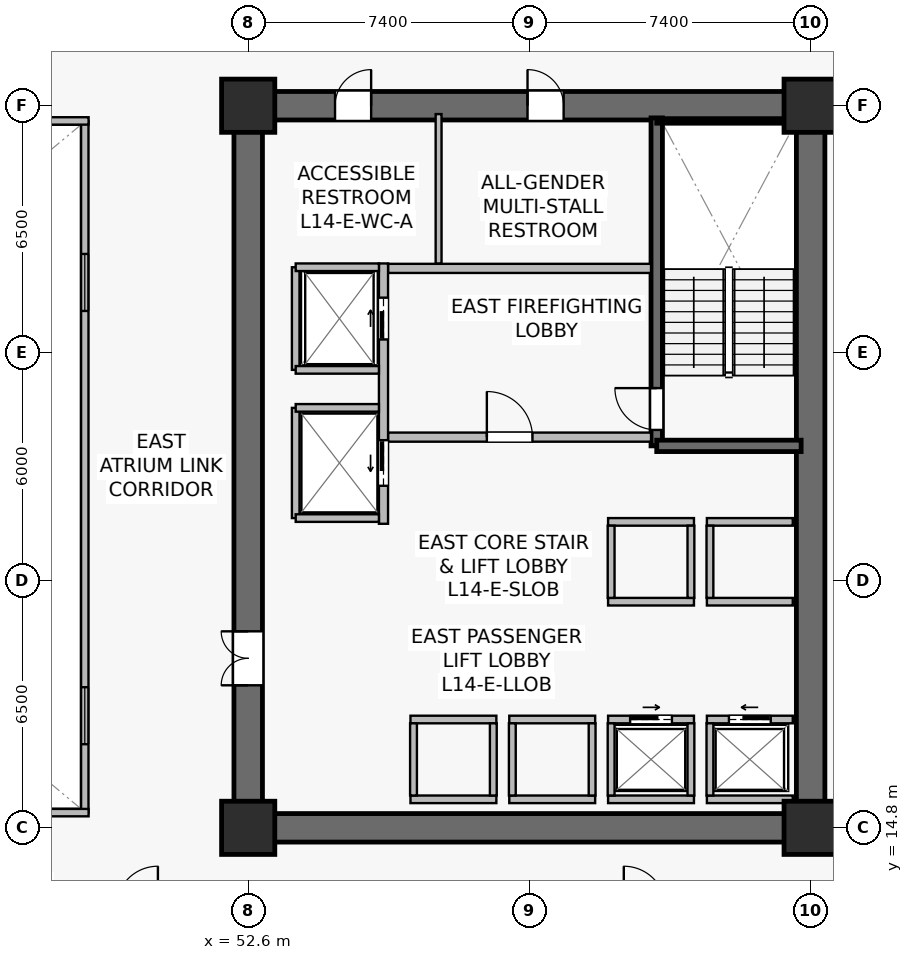
"""IFC4 building model, lengths in metres.
Left out: names, types, materials, properties, quantities, classifications, styles, units other than length and angle.
Written with IfcOpenShell. Run it as: python <this file> out.ifc"""

import sys

from ifc_helpers import new_model, si_unit, direction, frame, frame_2d, origin, origin_2d, place, context, subcontext, project, spatial, rectangle, extrude, source, transform, mapped, element, fill, save


model = new_model("IFC4")
c1 = context("Model", 3, precision=1e-05, world=origin(), true_north=direction((0.0, 1.0)))
c2 = subcontext(c1, "Body", "Model", "MODEL_VIEW")
j1 = project(units=[si_unit("LENGTHUNIT", "METRE"), si_unit("PLANEANGLEUNIT", "RADIAN")], contexts=[c1])
p1 = place(None, origin())
s1 = spatial("IfcSite", under=j1, at=p1, CompositionType="ELEMENT")
p2 = place(p1, origin())
s2 = spatial("IfcBuilding", under=s1, at=p2, CompositionType="ELEMENT")
p3 = place(p2, frame((0.0, 0.0, 58.0)))
s3 = spatial("IfcBuildingStorey", under=s2, at=p3, CompositionType="ELEMENT", Elevation=58.0)
p4 = place(p3, frame((52.225, 14.8, 0.0), z_axis=(0.0, 0.0, 1.0), x_axis=(1.0, 0.0, 0.0)))
e1 = element("IfcWall", 1, at=p4, inside=s3, PredefinedType="SHEAR", context=c2, shape_type="SweptSolid", body=[
    extrude(rectangle(XDim=15.55, YDim=0.75, at=frame_2d((7.775, 0.0))), origin(), (0.0, 0.0, 1.0), 3.78),
])
p5 = place(p3, frame((52.225, 33.8, 0.0), z_axis=(0.0, 0.0, 1.0), x_axis=(1.0, 0.0, 0.0)))
e2 = element("IfcWall", 2, at=p5, inside=s3, PredefinedType="SHEAR", context=c2, shape_type="SweptSolid", body=[
    extrude(rectangle(XDim=15.55, YDim=0.75, at=frame_2d((7.775, 0.0))), origin(), (0.0, 0.0, 1.0), 3.78),
])
p6 = place(p5, frame((7.725, 0.0, 0.0)))
e3 = element("IfcOpeningElement", 3, at=p6, cuts=e2, PredefinedType="OPENING", context=c2, shape_type="SweptSolid", body=[
    extrude(rectangle(XDim=0.95, YDim=2.15, at=frame_2d((0.475, 1.075))), frame((0.0, 0.385, 0.0), z_axis=(0.0, -1.0, 0.0), x_axis=(1.0, 0.0, 0.0)), (0.0, 0.0, 1.0), 0.77),
])
p7 = place(p5, frame((2.66, 0.0, 0.0)))
e4 = element("IfcOpeningElement", 4, at=p7, cuts=e2, PredefinedType="OPENING", context=c2, shape_type="SweptSolid", body=[
    extrude(rectangle(XDim=0.95, YDim=2.15, at=frame_2d((0.475, 1.075))), frame((0.0, 0.385, 0.0), z_axis=(0.0, -1.0, 0.0), x_axis=(1.0, 0.0, 0.0)), (0.0, 0.0, 1.0), 0.77),
])
p8 = place(p3, frame((52.6, 15.175, 0.0), z_axis=(0.0, 0.0, 1.0), x_axis=(0.0, 1.0, 0.0)))
e5 = element("IfcWall", 5, at=p8, inside=s3, PredefinedType="SHEAR", context=c2, shape_type="SweptSolid", body=[
    extrude(rectangle(XDim=18.25, YDim=0.75, at=frame_2d((9.125, 0.0))), origin(), (0.0, 0.0, 1.0), 3.78),
])
p9 = place(p8, frame((3.375, 0.0, 0.0)))
e6 = element("IfcOpeningElement", 6, at=p9, cuts=e5, PredefinedType="OPENING", context=c2, shape_type="SweptSolid", body=[
    extrude(rectangle(XDim=1.42, YDim=2.2, at=frame_2d((0.71, 1.1))), frame((0.0, 0.385, 0.0), z_axis=(0.0, -1.0, 0.0), x_axis=(1.0, 0.0, 0.0)), (0.0, 0.0, 1.0), 0.77),
])
p10 = place(p3, frame((67.4, 15.175, 0.0), z_axis=(0.0, 0.0, 1.0), x_axis=(0.0, 1.0, 0.0)))
e7 = element("IfcWall", 7, at=p10, inside=s3, PredefinedType="SHEAR", context=c2, shape_type="SweptSolid", body=[
    extrude(rectangle(XDim=18.25, YDim=0.75, at=frame_2d((9.125, 0.0))), origin(), (0.0, 0.0, 1.0), 3.78),
])
p11 = place(p3, frame((63.35, 24.85, 0.0), z_axis=(0.0, 0.0, 1.0), x_axis=(0.0, 1.0, 0.0)))
e8 = element("IfcWall", 8, at=p11, inside=s3, PredefinedType="SHEAR", context=c2, shape_type="SweptSolid", body=[
    extrude(rectangle(XDim=8.63, YDim=0.3, at=frame_2d((4.315, 0.0))), origin(), (0.0, 0.0, 1.0), 3.78),
])
p12 = place(p11, frame((0.42, 0.0, 0.0)))
e9 = element("IfcOpeningElement", 9, at=p12, cuts=e8, PredefinedType="OPENING", context=c2, shape_type="SweptSolid", body=[
    extrude(rectangle(XDim=1.1, YDim=2.15, at=frame_2d((0.55, 1.075))), frame((0.0, 0.16, 0.0), z_axis=(0.0, -1.0, 0.0), x_axis=(1.0, 0.0, 0.0)), (0.0, 0.0, 1.0), 0.32),
])
p13 = place(p3, frame((63.35, 24.85, 0.0), z_axis=(0.0, 0.0, 1.0), x_axis=(1.0, 0.0, 0.0)))
e10 = element("IfcWall", 10, at=p13, inside=s3, PredefinedType="SHEAR", context=c2, shape_type="SweptSolid", body=[
    extrude(rectangle(XDim=3.8, YDim=0.3, at=frame_2d((1.9, 0.0))), origin(), (0.0, 0.0, 1.0), 3.78),
])
p14 = place(p3, frame((63.35, 33.4, 0.0), z_axis=(0.0, 0.0, 1.0), x_axis=(1.0, 0.0, 0.0)))
e11 = element("IfcWall", 11, at=p14, inside=s3, PredefinedType="SOLIDWALL", context=c2, shape_type="SweptSolid", body=[
    extrude(rectangle(XDim=3.72, YDim=0.12, at=frame_2d((1.86, 0.0))), origin(), (0.0, 0.0, 1.0), 3.78),
])
m1 = source(origin(), c2, "Body", "SweptSolid", [
    extrude(rectangle(XDim=1.4, YDim=1.4, at=origin_2d()), origin(), (0.0, 0.0, 1.0), 4.1),
])
for number, where, z_axis, x_axis in (
    (12, (52.6, 14.8, 0.0), (0.0, 0.0, 1.0), (1.0, 0.0, 0.0)),
    (13, (67.4, 14.8, 0.0), (0.0, 0.0, 1.0), (1.0, 0.0, 0.0)),
    (14, (52.6, 33.8, 0.0), (0.0, 0.0, 1.0), (1.0, 0.0, 0.0)),
    (15, (67.4, 33.8, 0.0), (0.0, 0.0, 1.0), (1.0, 0.0, 0.0)),
):
    element("IfcColumn", number, at=place(p3, frame(where, z_axis=z_axis, x_axis=x_axis)), inside=s3, PredefinedType="COLUMN", context=c2, shape_type="MappedRepresentation", body=[
        mapped(m1, transform((0.0, 0.0, 0.0), scale=1.0)),
    ])
p15 = place(p3, frame((56.28, 25.08, 0.0), z_axis=(0.0, 0.0, 1.0), x_axis=(1.0, 0.0, 0.0)))
e16 = element("IfcWall", 16, at=p15, inside=s3, PredefinedType="SOLIDWALL", context=c2, shape_type="SweptSolid", body=[
    extrude(rectangle(XDim=6.92, YDim=0.24, at=frame_2d((3.46, 0.0))), origin(), (0.0, 0.0, 1.0), 3.065),
])
p16 = place(p15, frame((2.6, 0.0, 0.0)))
e17 = element("IfcOpeningElement", 17, at=p16, cuts=e16, PredefinedType="OPENING", context=c2, shape_type="SweptSolid", body=[
    extrude(rectangle(XDim=1.2, YDim=2.16, at=frame_2d((0.6, 1.08))), frame((0.0, 0.13, 0.0), z_axis=(0.0, -1.0, 0.0), x_axis=(1.0, 0.0, 0.0)), (0.0, 0.0, 1.0), 0.26),
])
p17 = place(p3, frame((56.28, 29.52, 0.0), z_axis=(0.0, 0.0, 1.0), x_axis=(1.0, 0.0, 0.0)))
e18 = element("IfcWall", 18, at=p17, inside=s3, PredefinedType="SOLIDWALL", context=c2, shape_type="SweptSolid", body=[
    extrude(rectangle(XDim=6.92, YDim=0.24, at=frame_2d((3.46, 0.0))), origin(), (0.0, 0.0, 1.0), 3.065),
])
p18 = place(p3, frame((56.16, 22.8, 0.0), z_axis=(0.0, 0.0, 1.0), x_axis=(0.0, 1.0, 0.0)))
e19 = element("IfcWall", 19, at=p18, inside=s3, PredefinedType="SOLIDWALL", context=c2, shape_type="SweptSolid", body=[
    extrude(rectangle(XDim=6.85, YDim=0.24, at=frame_2d((3.425, 0.0))), origin(), (0.0, 0.0, 1.0), 2.865),
])
p19 = place(p18, frame((4.85, 0.0, 0.0)))
e20 = element("IfcOpeningElement", 20, at=p19, cuts=e19, PredefinedType="OPENING", context=c2, shape_type="SweptSolid", body=[
    extrude(rectangle(XDim=1.1, YDim=2.22, at=frame_2d((0.55, 1.11))), frame((0.0, 0.13, 0.0), z_axis=(0.0, -1.0, 0.0), x_axis=(1.0, 0.0, 0.0)), (0.0, 0.0, 1.0), 0.26),
])
p20 = place(p18, frame((1.0, 0.0, 0.0)))
e21 = element("IfcOpeningElement", 21, at=p20, cuts=e19, PredefinedType="OPENING", context=c2, shape_type="SweptSolid", body=[
    extrude(rectangle(XDim=1.2, YDim=2.22, at=frame_2d((0.6, 1.11))), frame((0.0, 0.13, 0.0), z_axis=(0.0, -1.0, 0.0), x_axis=(1.0, 0.0, 0.0)), (0.0, 0.0, 1.0), 0.26),
])
p21 = place(p3, frame((64.67, 17.65, 0.0), z_axis=(0.0, 0.0, 1.0), x_axis=(1.0, 0.0, 0.0)))
e22 = element("IfcWall", 22, at=p21, inside=s3, PredefinedType="SOLIDWALL", context=c2, shape_type="SweptSolid", body=[
    extrude(rectangle(XDim=2.26, YDim=0.2, at=frame_2d((1.13, 0.0))), origin(), (0.0, 0.0, 1.0), 3.78),
])
p22 = place(p21, frame((0.58, 0.0, 0.0)))
e23 = element("IfcOpeningElement", 23, at=p22, cuts=e22, PredefinedType="OPENING", context=c2, shape_type="SweptSolid", body=[
    extrude(rectangle(XDim=1.1, YDim=2.22, at=frame_2d((0.55, 1.11))), frame((0.0, 0.11, 0.0), z_axis=(0.0, -1.0, 0.0), x_axis=(1.0, 0.0, 0.0)), (0.0, 0.0, 1.0), 0.22),
])
p23 = place(p3, frame((64.67, 15.55, 0.0), z_axis=(0.0, 0.0, 1.0), x_axis=(1.0, 0.0, 0.0)))
e24 = element("IfcWall", 24, at=p23, inside=s3, PredefinedType="SOLIDWALL", context=c2, shape_type="SweptSolid", body=[
    extrude(rectangle(XDim=2.26, YDim=0.2, at=frame_2d((1.13, 0.0))), origin(), (0.0, 0.0, 1.0), 3.78),
])
p24 = place(p3, frame((64.75, 15.65, 0.0), z_axis=(0.0, 0.0, 1.0), x_axis=(0.0, 1.0, 0.0)))
e25 = element("IfcWall", 25, at=p24, inside=s3, PredefinedType="SOLIDWALL", context=c2, shape_type="SweptSolid", body=[
    extrude(rectangle(XDim=1.9, YDim=0.18, at=frame_2d((0.95, 0.0))), origin(), (0.0, 0.0, 1.0), 3.78),
])
p25 = place(p3, frame((62.07, 17.65, 0.0), z_axis=(0.0, 0.0, 1.0), x_axis=(1.0, 0.0, 0.0)))
e26 = element("IfcWall", 26, at=p25, inside=s3, PredefinedType="SOLIDWALL", context=c2, shape_type="SweptSolid", body=[
    extrude(rectangle(XDim=2.26, YDim=0.2, at=frame_2d((1.13, 0.0))), origin(), (0.0, 0.0, 1.0), 3.78),
])
p26 = place(p25, frame((0.58, 0.0, 0.0)))
e27 = element("IfcOpeningElement", 27, at=p26, cuts=e26, PredefinedType="OPENING", context=c2, shape_type="SweptSolid", body=[
    extrude(rectangle(XDim=1.1, YDim=2.22, at=frame_2d((0.55, 1.11))), frame((0.0, 0.11, 0.0), z_axis=(0.0, -1.0, 0.0), x_axis=(1.0, 0.0, 0.0)), (0.0, 0.0, 1.0), 0.22),
])
p27 = place(p3, frame((62.07, 15.55, 0.0), z_axis=(0.0, 0.0, 1.0), x_axis=(1.0, 0.0, 0.0)))
e28 = element("IfcWall", 28, at=p27, inside=s3, PredefinedType="SOLIDWALL", context=c2, shape_type="SweptSolid", body=[
    extrude(rectangle(XDim=2.26, YDim=0.2, at=frame_2d((1.13, 0.0))), origin(), (0.0, 0.0, 1.0), 3.78),
])
for number, where, z_axis, x_axis in (
    (29, (62.15, 15.65, 0.0), (0.0, 0.0, 1.0), (0.0, 1.0, 0.0)),
    (30, (64.25, 15.65, 0.0), (0.0, 0.0, 1.0), (0.0, 1.0, 0.0)),
):
    element("IfcWall", number, at=place(p3, frame(where, z_axis=z_axis, x_axis=x_axis)), inside=s3, PredefinedType="SOLIDWALL", context=c2, shape_type="SweptSolid", body=[
        extrude(rectangle(XDim=1.9, YDim=0.18, at=frame_2d((0.95, 0.0))), origin(), (0.0, 0.0, 1.0), 3.78),
    ])
for number, where, z_axis, x_axis in (
    (31, (59.47, 17.65, 0.0), (0.0, 0.0, 1.0), (1.0, 0.0, 0.0)),
    (32, (59.47, 15.55, 0.0), (0.0, 0.0, 1.0), (1.0, 0.0, 0.0)),
):
    element("IfcWall", number, at=place(p3, frame(where, z_axis=z_axis, x_axis=x_axis)), inside=s3, PredefinedType="SOLIDWALL", context=c2, shape_type="SweptSolid", body=[
        extrude(rectangle(XDim=2.26, YDim=0.2, at=frame_2d((1.13, 0.0))), origin(), (0.0, 0.0, 1.0), 3.065),
    ])
for number, where, z_axis, x_axis in (
    (33, (59.55, 15.65, 0.0), (0.0, 0.0, 1.0), (0.0, 1.0, 0.0)),
    (34, (61.65, 15.65, 0.0), (0.0, 0.0, 1.0), (0.0, 1.0, 0.0)),
):
    element("IfcWall", number, at=place(p3, frame(where, z_axis=z_axis, x_axis=x_axis)), inside=s3, PredefinedType="SOLIDWALL", context=c2, shape_type="SweptSolid", body=[
        extrude(rectangle(XDim=1.9, YDim=0.18, at=frame_2d((0.95, 0.0))), origin(), (0.0, 0.0, 1.0), 3.78),
    ])
for number, where, z_axis, x_axis in (
    (35, (56.87, 17.65, 0.0), (0.0, 0.0, 1.0), (1.0, 0.0, 0.0)),
    (36, (56.87, 15.55, 0.0), (0.0, 0.0, 1.0), (1.0, 0.0, 0.0)),
):
    element("IfcWall", number, at=place(p3, frame(where, z_axis=z_axis, x_axis=x_axis)), inside=s3, PredefinedType="SOLIDWALL", context=c2, shape_type="SweptSolid", body=[
        extrude(rectangle(XDim=2.26, YDim=0.2, at=frame_2d((1.13, 0.0))), origin(), (0.0, 0.0, 1.0), 3.78),
    ])
for number, where, z_axis, x_axis in (
    (37, (56.95, 15.65, 0.0), (0.0, 0.0, 1.0), (0.0, 1.0, 0.0)),
    (38, (59.05, 15.65, 0.0), (0.0, 0.0, 1.0), (0.0, 1.0, 0.0)),
):
    element("IfcWall", number, at=place(p3, frame(where, z_axis=z_axis, x_axis=x_axis)), inside=s3, PredefinedType="SOLIDWALL", context=c2, shape_type="SweptSolid", body=[
        extrude(rectangle(XDim=1.9, YDim=0.18, at=frame_2d((0.95, 0.0))), origin(), (0.0, 0.0, 1.0), 3.78),
    ])
for number, where, z_axis, x_axis in (
    (39, (64.67, 20.75, 0.0), (0.0, 0.0, 1.0), (1.0, 0.0, 0.0)),
    (40, (64.67, 22.85, 0.0), (0.0, 0.0, 1.0), (1.0, 0.0, 0.0)),
):
    element("IfcWall", number, at=place(p3, frame(where, z_axis=z_axis, x_axis=x_axis)), inside=s3, PredefinedType="SOLIDWALL", context=c2, shape_type="SweptSolid", body=[
        extrude(rectangle(XDim=2.26, YDim=0.2, at=frame_2d((1.13, 0.0))), origin(), (0.0, 0.0, 1.0), 3.78),
    ])
p28 = place(p3, frame((64.75, 20.85, 0.0), z_axis=(0.0, 0.0, 1.0), x_axis=(0.0, 1.0, 0.0)))
e41 = element("IfcWall", 41, at=p28, inside=s3, PredefinedType="SOLIDWALL", context=c2, shape_type="SweptSolid", body=[
    extrude(rectangle(XDim=1.9, YDim=0.18, at=frame_2d((0.95, 0.0))), origin(), (0.0, 0.0, 1.0), 3.78),
])
for number, where, z_axis, x_axis in (
    (42, (62.07, 20.75, 0.0), (0.0, 0.0, 1.0), (1.0, 0.0, 0.0)),
    (43, (62.07, 22.85, 0.0), (0.0, 0.0, 1.0), (1.0, 0.0, 0.0)),
):
    element("IfcWall", number, at=place(p3, frame(where, z_axis=z_axis, x_axis=x_axis)), inside=s3, PredefinedType="SOLIDWALL", context=c2, shape_type="SweptSolid", body=[
        extrude(rectangle(XDim=2.26, YDim=0.2, at=frame_2d((1.13, 0.0))), origin(), (0.0, 0.0, 1.0), 3.78),
    ])
for number, where, z_axis, x_axis in (
    (44, (62.15, 20.85, 0.0), (0.0, 0.0, 1.0), (0.0, 1.0, 0.0)),
    (45, (64.25, 20.85, 0.0), (0.0, 0.0, 1.0), (0.0, 1.0, 0.0)),
):
    element("IfcWall", number, at=place(p3, frame(where, z_axis=z_axis, x_axis=x_axis)), inside=s3, PredefinedType="SOLIDWALL", context=c2, shape_type="SweptSolid", body=[
        extrude(rectangle(XDim=1.9, YDim=0.18, at=frame_2d((0.95, 0.0))), origin(), (0.0, 0.0, 1.0), 3.78),
    ])
p29 = place(p3, frame((53.85, 26.85, 0.0), z_axis=(0.0, 0.0, 1.0), x_axis=(0.0, 1.0, 0.0)))
e46 = element("IfcWall", 46, at=p29, inside=s3, PredefinedType="SOLIDWALL", context=c2, shape_type="SweptSolid", body=[
    extrude(rectangle(XDim=2.7, YDim=0.2, at=frame_2d((1.35, 0.0))), origin(), (0.0, 0.0, 1.0), 3.78),
])
p30 = place(p3, frame((53.85, 29.55, 0.0), z_axis=(0.0, 0.0, 1.0), x_axis=(1.0, 0.0, 0.0)))
e47 = element("IfcWall", 47, at=p30, inside=s3, PredefinedType="SOLIDWALL", context=c2, shape_type="SweptSolid", body=[
    extrude(rectangle(XDim=2.19, YDim=0.2, at=frame_2d((1.095, 0.0))), origin(), (0.0, 0.0, 1.0), 3.78),
])
p31 = place(p3, frame((53.85, 26.85, 0.0), z_axis=(0.0, 0.0, 1.0), x_axis=(1.0, 0.0, 0.0)))
e48 = element("IfcWall", 48, at=p31, inside=s3, PredefinedType="SOLIDWALL", context=c2, shape_type="SweptSolid", body=[
    extrude(rectangle(XDim=2.19, YDim=0.2, at=frame_2d((1.095, 0.0))), origin(), (0.0, 0.0, 1.0), 3.177),
])
p32 = place(p3, frame((53.85, 22.95, 0.0), z_axis=(0.0, 0.0, 1.0), x_axis=(0.0, 1.0, 0.0)))
e49 = element("IfcWall", 49, at=p32, inside=s3, PredefinedType="SOLIDWALL", context=c2, shape_type="SweptSolid", body=[
    extrude(rectangle(XDim=2.9, YDim=0.2, at=frame_2d((1.45, 0.0))), origin(), (0.0, 0.0, 1.0), 2.865),
])
for number, where, z_axis, x_axis in (
    (50, (53.85, 25.85, 0.0), (0.0, 0.0, 1.0), (1.0, 0.0, 0.0)),
    (51, (53.85, 22.95, 0.0), (0.0, 0.0, 1.0), (1.0, 0.0, 0.0)),
):
    element("IfcWall", number, at=place(p3, frame(where, z_axis=z_axis, x_axis=x_axis)), inside=s3, PredefinedType="SOLIDWALL", context=c2, shape_type="SweptSolid", body=[
        extrude(rectangle(XDim=2.19, YDim=0.2, at=frame_2d((1.095, 0.0))), origin(), (0.0, 0.0, 1.0), 3.78),
    ])
p33 = place(p3, frame((57.61, 29.65, 0.0), z_axis=(0.0, 0.0, 1.0), x_axis=(0.0, 1.0, 0.0)))
e52 = element("IfcWall", 52, at=p33, inside=s3, PredefinedType="PLUMBINGWALL", context=c2, shape_type="SweptSolid", body=[
    extrude(rectangle(XDim=3.93, YDim=0.155, at=frame_2d((1.965, 0.0))), origin(), (0.0, 0.0, 1.0), 3.78),
])
p34 = place(p3, frame((48.3, 15.2, 0.0), z_axis=(0.0, 0.0, 1.0), x_axis=(0.0, 1.0, 0.0)))
e53 = element("IfcWall", 53, at=p34, inside=s3, PredefinedType="SOLIDWALL", context=c2, shape_type="SweptSolid", body=[
    extrude(rectangle(XDim=18.2, YDim=0.195, at=frame_2d((9.1, 0.0))), origin(), (0.0, 0.0, 1.0), 3.78),
])
p35 = place(p34, frame((1.8, 0.0, 0.9)))
e54 = element("IfcOpeningElement", 54, at=p35, cuts=e53, PredefinedType="OPENING", context=c2, shape_type="SweptSolid", body=[
    extrude(rectangle(XDim=1.5, YDim=1.4, at=frame_2d((0.75, 0.7))), frame((0.0, 0.107, 0.0), z_axis=(0.0, -1.0, 0.0), x_axis=(1.0, 0.0, 0.0)), (0.0, 0.0, 1.0), 0.215),
])
p36 = place(p34, frame((13.2, 0.0, 0.9)))
e55 = element("IfcOpeningElement", 55, at=p36, cuts=e53, PredefinedType="OPENING", context=c2, shape_type="SweptSolid", body=[
    extrude(rectangle(XDim=1.5, YDim=1.4, at=frame_2d((0.75, 0.7))), frame((0.0, 0.107, 0.0), z_axis=(0.0, -1.0, 0.0), x_axis=(1.0, 0.0, 0.0)), (0.0, 0.0, 1.0), 0.215),
])
for number, where, z_axis, x_axis in (
    (56, (26.4, 15.2, 0.0), (0.0, 0.0, 1.0), (1.0, 0.0, 0.0)),
    (57, (26.4, 33.4, 0.0), (0.0, 0.0, 1.0), (1.0, 0.0, 0.0)),
):
    element("IfcWall", number, at=place(p3, frame(where, z_axis=z_axis, x_axis=x_axis)), inside=s3, PredefinedType="SOLIDWALL", context=c2, shape_type="SweptSolid", body=[
        extrude(rectangle(XDim=22.0, YDim=0.195, at=frame_2d((11.0, 0.0))), origin(), (0.0, 0.0, 1.0), 3.78),
    ])
m2 = source(origin(), c2, "Body", "SweptSolid", [
    extrude(rectangle(XDim=1.5, YDim=1.4, at=frame_2d((0.75, 0.7))), frame((0.0, 0.03, 0.0), z_axis=(0.0, -1.0, 0.0), x_axis=(1.0, 0.0, 0.0)), (0.0, 0.0, 1.0), 0.06),
])
p37 = place(p35, origin())
e58 = element("IfcWindow", 58, at=p37, inside=s3, PartitioningType="SINGLE_PANEL", PredefinedType="WINDOW", context=c2, shape_type="MappedRepresentation", body=[
    mapped(m2, transform((0.0, 0.0, 0.0), scale=1.0)),
])
fill(e54, e58)
p38 = place(p36, origin())
e59 = element("IfcWindow", 59, at=p38, inside=s3, PartitioningType="SINGLE_PANEL", PredefinedType="WINDOW", context=c2, shape_type="MappedRepresentation", body=[
    mapped(m2, transform((0.0, 0.0, 0.0), scale=1.0)),
])
fill(e55, e59)
m3 = source(origin(), c2, "Body", "SweptSolid", [
    extrude(rectangle(XDim=1.1, YDim=2.15, at=frame_2d((0.55, 1.075))), frame((0.0, 0.025, 0.0), z_axis=(0.0, -1.0, 0.0), x_axis=(1.0, 0.0, 0.0)), (0.0, 0.0, 1.0), 0.05),
])
p39 = place(p12, origin())
e60 = element("IfcDoor", 60, at=p39, inside=s3, OperationType="SINGLE_SWING_RIGHT", PredefinedType="DOOR", context=c2, shape_type="MappedRepresentation", body=[
    mapped(m3, transform((0.0, 0.0, 0.0), scale=1.0)),
])
fill(e9, e60)
m4 = source(origin(), c2, "Body", "SweptSolid", [
    extrude(rectangle(XDim=1.2, YDim=2.16, at=frame_2d((0.6, 1.08))), frame((0.0, 0.025, 0.0), z_axis=(0.0, -1.0, 0.0), x_axis=(1.0, 0.0, 0.0)), (0.0, 0.0, 1.0), 0.05),
])
p40 = place(p16, origin())
e61 = element("IfcDoor", 61, at=p40, inside=s3, OperationType="SINGLE_SWING_LEFT", PredefinedType="DOOR", context=c2, shape_type="MappedRepresentation", body=[
    mapped(m4, transform((0.0, 0.0, 0.0), scale=1.0)),
])
fill(e17, e61)
m5 = source(origin(), c2, "Body", "SweptSolid", [
    extrude(rectangle(XDim=1.1, YDim=2.22, at=frame_2d((0.55, 1.11))), frame((0.0, 0.025, 0.0), z_axis=(0.0, -1.0, 0.0), x_axis=(1.0, 0.0, 0.0)), (0.0, 0.0, 1.0), 0.05),
])
p41 = place(p22, origin())
e62 = element("IfcDoor", 62, at=p41, inside=s3, OperationType="SLIDING_TO_LEFT", PredefinedType="USERDEFINED", context=c2, shape_type="MappedRepresentation", body=[
    mapped(m5, transform((0.0, 0.0, 0.0), scale=1.0)),
])
fill(e23, e62)
p42 = place(p26, origin())
e63 = element("IfcDoor", 63, at=p42, inside=s3, OperationType="SLIDING_TO_RIGHT", PredefinedType="USERDEFINED", context=c2, shape_type="MappedRepresentation", body=[
    mapped(m5, transform((0.0, 0.0, 0.0), scale=1.0)),
])
fill(e27, e63)
p43 = place(p19, origin())
e64 = element("IfcDoor", 64, at=p43, inside=s3, OperationType="SLIDING_TO_RIGHT", PredefinedType="USERDEFINED", context=c2, shape_type="MappedRepresentation", body=[
    mapped(m5, transform((0.0, 0.0, 0.0), scale=1.0)),
])
fill(e20, e64)
m6 = source(origin(), c2, "Body", "SweptSolid", [
    extrude(rectangle(XDim=1.2, YDim=2.22, at=frame_2d((0.6, 1.11))), frame((0.0, 0.025, 0.0), z_axis=(0.0, -1.0, 0.0), x_axis=(1.0, 0.0, 0.0)), (0.0, 0.0, 1.0), 0.05),
])
p44 = place(p20, origin())
e65 = element("IfcDoor", 65, at=p44, inside=s3, OperationType="SLIDING_TO_LEFT", PredefinedType="USERDEFINED", context=c2, shape_type="MappedRepresentation", body=[
    mapped(m6, transform((0.0, 0.0, 0.0), scale=1.0)),
])
fill(e21, e65)
m7 = source(origin(), c2, "Body", "SweptSolid", [
    extrude(rectangle(XDim=1.42, YDim=2.2, at=frame_2d((0.71, 1.1))), frame((0.0, 0.025, 0.0), z_axis=(0.0, -1.0, 0.0), x_axis=(1.0, 0.0, 0.0)), (0.0, 0.0, 1.0), 0.05),
])
p45 = place(p9, origin())
e66 = element("IfcDoor", 66, at=p45, inside=s3, OperationType="DOUBLE_DOOR_SINGLE_SWING", PredefinedType="DOOR", context=c2, shape_type="MappedRepresentation", body=[
    mapped(m7, transform((0.0, 0.0, 0.0), scale=1.0)),
])
fill(e6, e66)
m8 = source(origin(), c2, "Body", "SweptSolid", [
    extrude(rectangle(XDim=0.95, YDim=2.15, at=frame_2d((0.475, 1.075))), frame((0.0, 0.025, 0.0), z_axis=(0.0, -1.0, 0.0), x_axis=(1.0, 0.0, 0.0)), (0.0, 0.0, 1.0), 0.05),
])
p46 = place(p6, origin())
e67 = element("IfcDoor", 67, at=p46, inside=s3, OperationType="SINGLE_SWING_LEFT", PredefinedType="DOOR", context=c2, shape_type="MappedRepresentation", body=[
    mapped(m8, transform((0.0, 0.0, 0.0), scale=1.0)),
])
fill(e3, e67)
p47 = place(p7, origin())
e68 = element("IfcDoor", 68, at=p47, inside=s3, OperationType="SINGLE_SWING_RIGHT", PredefinedType="DOOR", context=c2, shape_type="MappedRepresentation", body=[
    mapped(m8, transform((0.0, 0.0, 0.0), scale=1.0)),
])
fill(e4, e68)
save(model, sys.argv[1])
